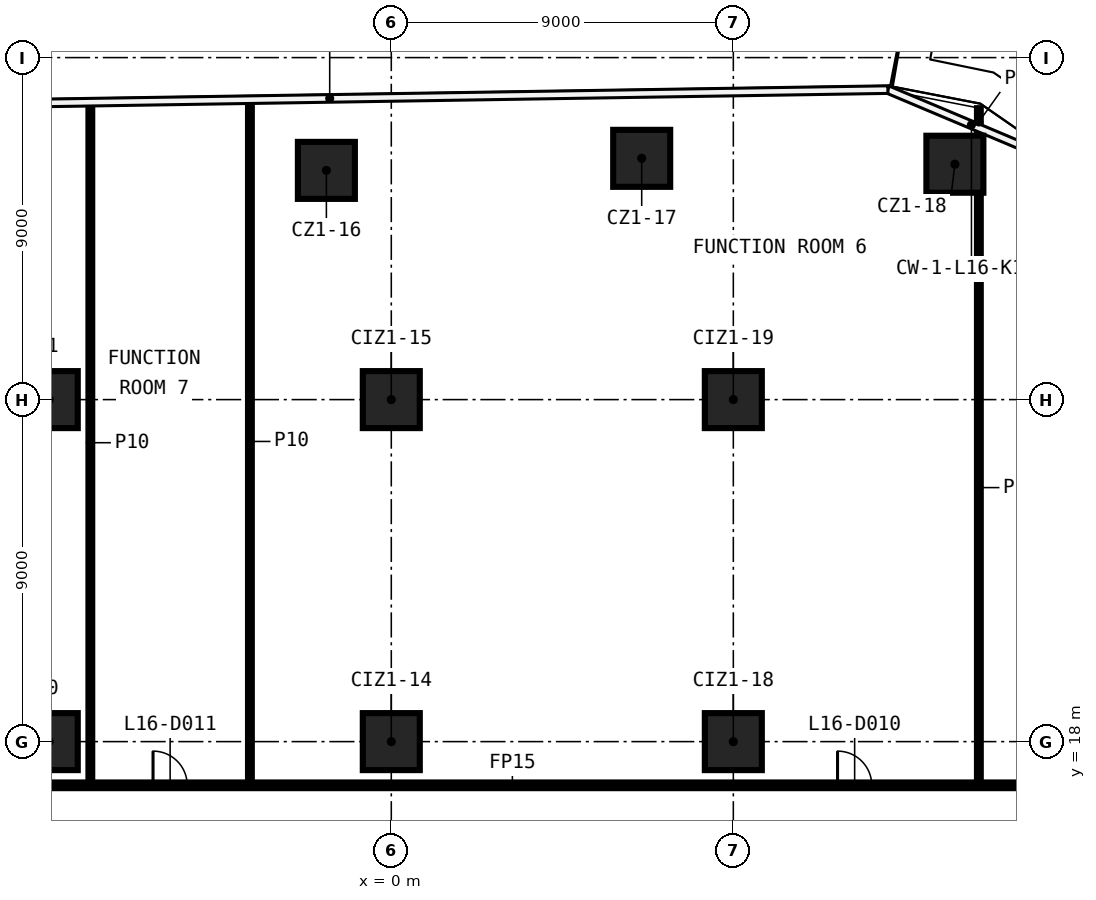
"""IFC4 building model, lengths in metres.
Left out: names, types, materials, properties, quantities, classifications, styles, units other than length and angle.
Written with IfcOpenShell. Run it as: python <this file> out.ifc"""

import sys

from ifc_helpers import new_model, si_unit, direction, frame, frame_2d, origin, origin_2d, place, context, subcontext, project, spatial, rectangle, extrude, element, fill, save


model = new_model("IFC4")
c1 = context("Model", 3, precision=1e-05, world=origin(), true_north=direction((0.0, 1.0)))
c2 = subcontext(c1, "Body", "Model", "MODEL_VIEW")
j1 = project(units=[si_unit("LENGTHUNIT", "METRE"), si_unit("PLANEANGLEUNIT", "RADIAN")], contexts=[c1])
p1 = place(None, origin())
s1 = spatial("IfcSite", under=j1, at=p1, CompositionType="ELEMENT")
p2 = place(p1, origin())
s2 = spatial("IfcBuilding", under=s1, at=p2, CompositionType="ELEMENT")
p3 = place(p2, frame((0.0, 0.0, 81.0)))
s3 = spatial("IfcBuildingStorey", under=s2, at=p3, CompositionType="ELEMENT", Elevation=81.0)
for number, where, z_axis, x_axis in (
    (1, (-1.708, 33.032, 0.0), (0.0, 0.0, 1.0), (1.0, 0.0, 0.0)),
    (2, (6.589, 33.349, 0.0), (0.0, 0.0, 1.0), (1.0, 0.0, 0.0)),
    (3, (14.83, 33.194, 0.0), (0.0, 0.0, 1.0), (1.0, 0.0, 0.0)),
    (4, (-9.0, 18.0, 0.0), (0.0, 0.0, 1.0), (1.0, 0.0, 0.0)),
    (5, (-9.0, 27.0, 0.0), (0.0, 0.0, 1.0), (1.0, 0.0, 0.0)),
    (6, (0.0, 18.0, 0.0), (0.0, 0.0, 1.0), (1.0, 0.0, 0.0)),
    (7, (0.0, 27.0, 0.0), (0.0, 0.0, 1.0), (1.0, 0.0, 0.0)),
    (8, (9.0, 18.0, 0.0), (0.0, 0.0, 1.0), (1.0, 0.0, 0.0)),
    (9, (9.0, 27.0, 0.0), (0.0, 0.0, 1.0), (1.0, 0.0, 0.0)),
):
    element("IfcColumn", number, at=place(p3, frame(where, z_axis=z_axis, x_axis=x_axis)), inside=s3, PredefinedType="COLUMN", context=c2, shape_type="SweptSolid", body=[
        extrude(rectangle(XDim=1.5, YDim=1.5, at=origin_2d()), origin(), (0.0, 0.0, 1.0), 3.3),
    ])
p4 = place(p3, frame((-19.925, 16.85, 0.0), z_axis=(0.0, 0.0, 1.0), x_axis=(1.0, 0.0, 0.0)))
e10 = element("IfcWall", 10, at=p4, inside=s3, PredefinedType="PARTITIONING", context=c2, shape_type="SweptSolid", body=[
    extrude(rectangle(XDim=39.85, YDim=0.15, at=frame_2d((19.925, 0.0))), origin(), (0.0, 0.0, 1.0), 3.3),
])
p5 = place(p4, frame((31.667, 0.0, 0.0)))
e11 = element("IfcOpeningElement", 11, at=p5, cuts=e10, PredefinedType="OPENING", context=c2, shape_type="SweptSolid", body=[
    extrude(rectangle(XDim=0.9, YDim=2.1, at=frame_2d((0.45, 1.05))), frame((0.0, 0.085, 0.0), z_axis=(0.0, -1.0, 0.0), x_axis=(1.0, 0.0, 0.0)), (0.0, 0.0, 1.0), 0.17),
])
p6 = place(p4, frame((13.656, 0.0, 0.0)))
e12 = element("IfcOpeningElement", 12, at=p6, cuts=e10, PredefinedType="OPENING", context=c2, shape_type="SweptSolid", body=[
    extrude(rectangle(XDim=0.9, YDim=2.1, at=frame_2d((0.45, 1.05))), frame((0.0, 0.085, 0.0), z_axis=(0.0, -1.0, 0.0), x_axis=(1.0, 0.0, 0.0)), (0.0, 0.0, 1.0), 0.17),
])
p7 = place(p3, frame((15.461, 16.925, 0.0), z_axis=(0.0, 0.0, 1.0), x_axis=(0.0, 1.0, 0.0)))
e13 = element("IfcWall", 13, at=p7, inside=s3, PredefinedType="PARTITIONING", context=c2, shape_type="SweptSolid", body=[
    extrude(rectangle(XDim=15.519, YDim=0.1, at=frame_2d((7.76, 0.0))), origin(), (0.0, 0.0, 1.0), 3.3),
])
p8 = place(p3, frame((15.461, 33.944, 0.0), z_axis=(0.0, 0.0, 1.0), x_axis=(0.0, 1.0, 0.0)))
e14 = element("IfcWall", 14, at=p8, inside=s3, PredefinedType="PARTITIONING", context=c2, shape_type="SweptSolid", body=[
    extrude(rectangle(XDim=0.725, YDim=0.1, at=frame_2d((0.363, 0.0))), origin(), (0.0, 0.0, 1.0), 3.3),
])
p9 = place(p3, frame((-3.72, 16.925, 0.0), z_axis=(0.0, 0.0, 1.0), x_axis=(0.0, 1.0, 0.0)))
e15 = element("IfcWall", 15, at=p9, inside=s3, PredefinedType="PARTITIONING", context=c2, shape_type="SweptSolid", body=[
    extrude(rectangle(XDim=17.948, YDim=0.1, at=frame_2d((8.974, 0.0))), origin(), (0.0, 0.0, 1.0), 3.3),
])
p10 = place(p3, frame((-7.919, 16.925, 0.0), z_axis=(0.0, 0.0, 1.0), x_axis=(0.0, 1.0, 0.0)))
e16 = element("IfcWall", 16, at=p10, inside=s3, PredefinedType="PARTITIONING", context=c2, shape_type="SweptSolid", body=[
    extrude(rectangle(XDim=17.881, YDim=0.1, at=frame_2d((8.941, 0.0))), origin(), (0.0, 0.0, 1.0), 3.3),
])
p11 = place(p5, origin())
e17 = element("IfcDoor", 17, at=p11, inside=s3, OperationType="SINGLE_SWING_LEFT", PredefinedType="DOOR", context=c2, shape_type="SweptSolid", body=[
    extrude(rectangle(XDim=0.9, YDim=2.1, at=frame_2d((0.45, 1.05))), frame((0.0, 0.025, 0.0), z_axis=(0.0, -1.0, 0.0), x_axis=(1.0, 0.0, 0.0)), (0.0, 0.0, 1.0), 0.05),
])
fill(e11, e17)
p12 = place(p6, origin())
e18 = element("IfcDoor", 18, at=p12, inside=s3, OperationType="SINGLE_SWING_RIGHT", PredefinedType="DOOR", context=c2, shape_type="SweptSolid", body=[
    extrude(rectangle(XDim=0.9, YDim=2.1, at=frame_2d((0.45, 1.05))), frame((0.0, 0.025, 0.0), z_axis=(0.0, -1.0, 0.0), x_axis=(1.0, 0.0, 0.0)), (0.0, 0.0, 1.0), 0.05),
])
fill(e12, e18)
save(model, sys.argv[1])
